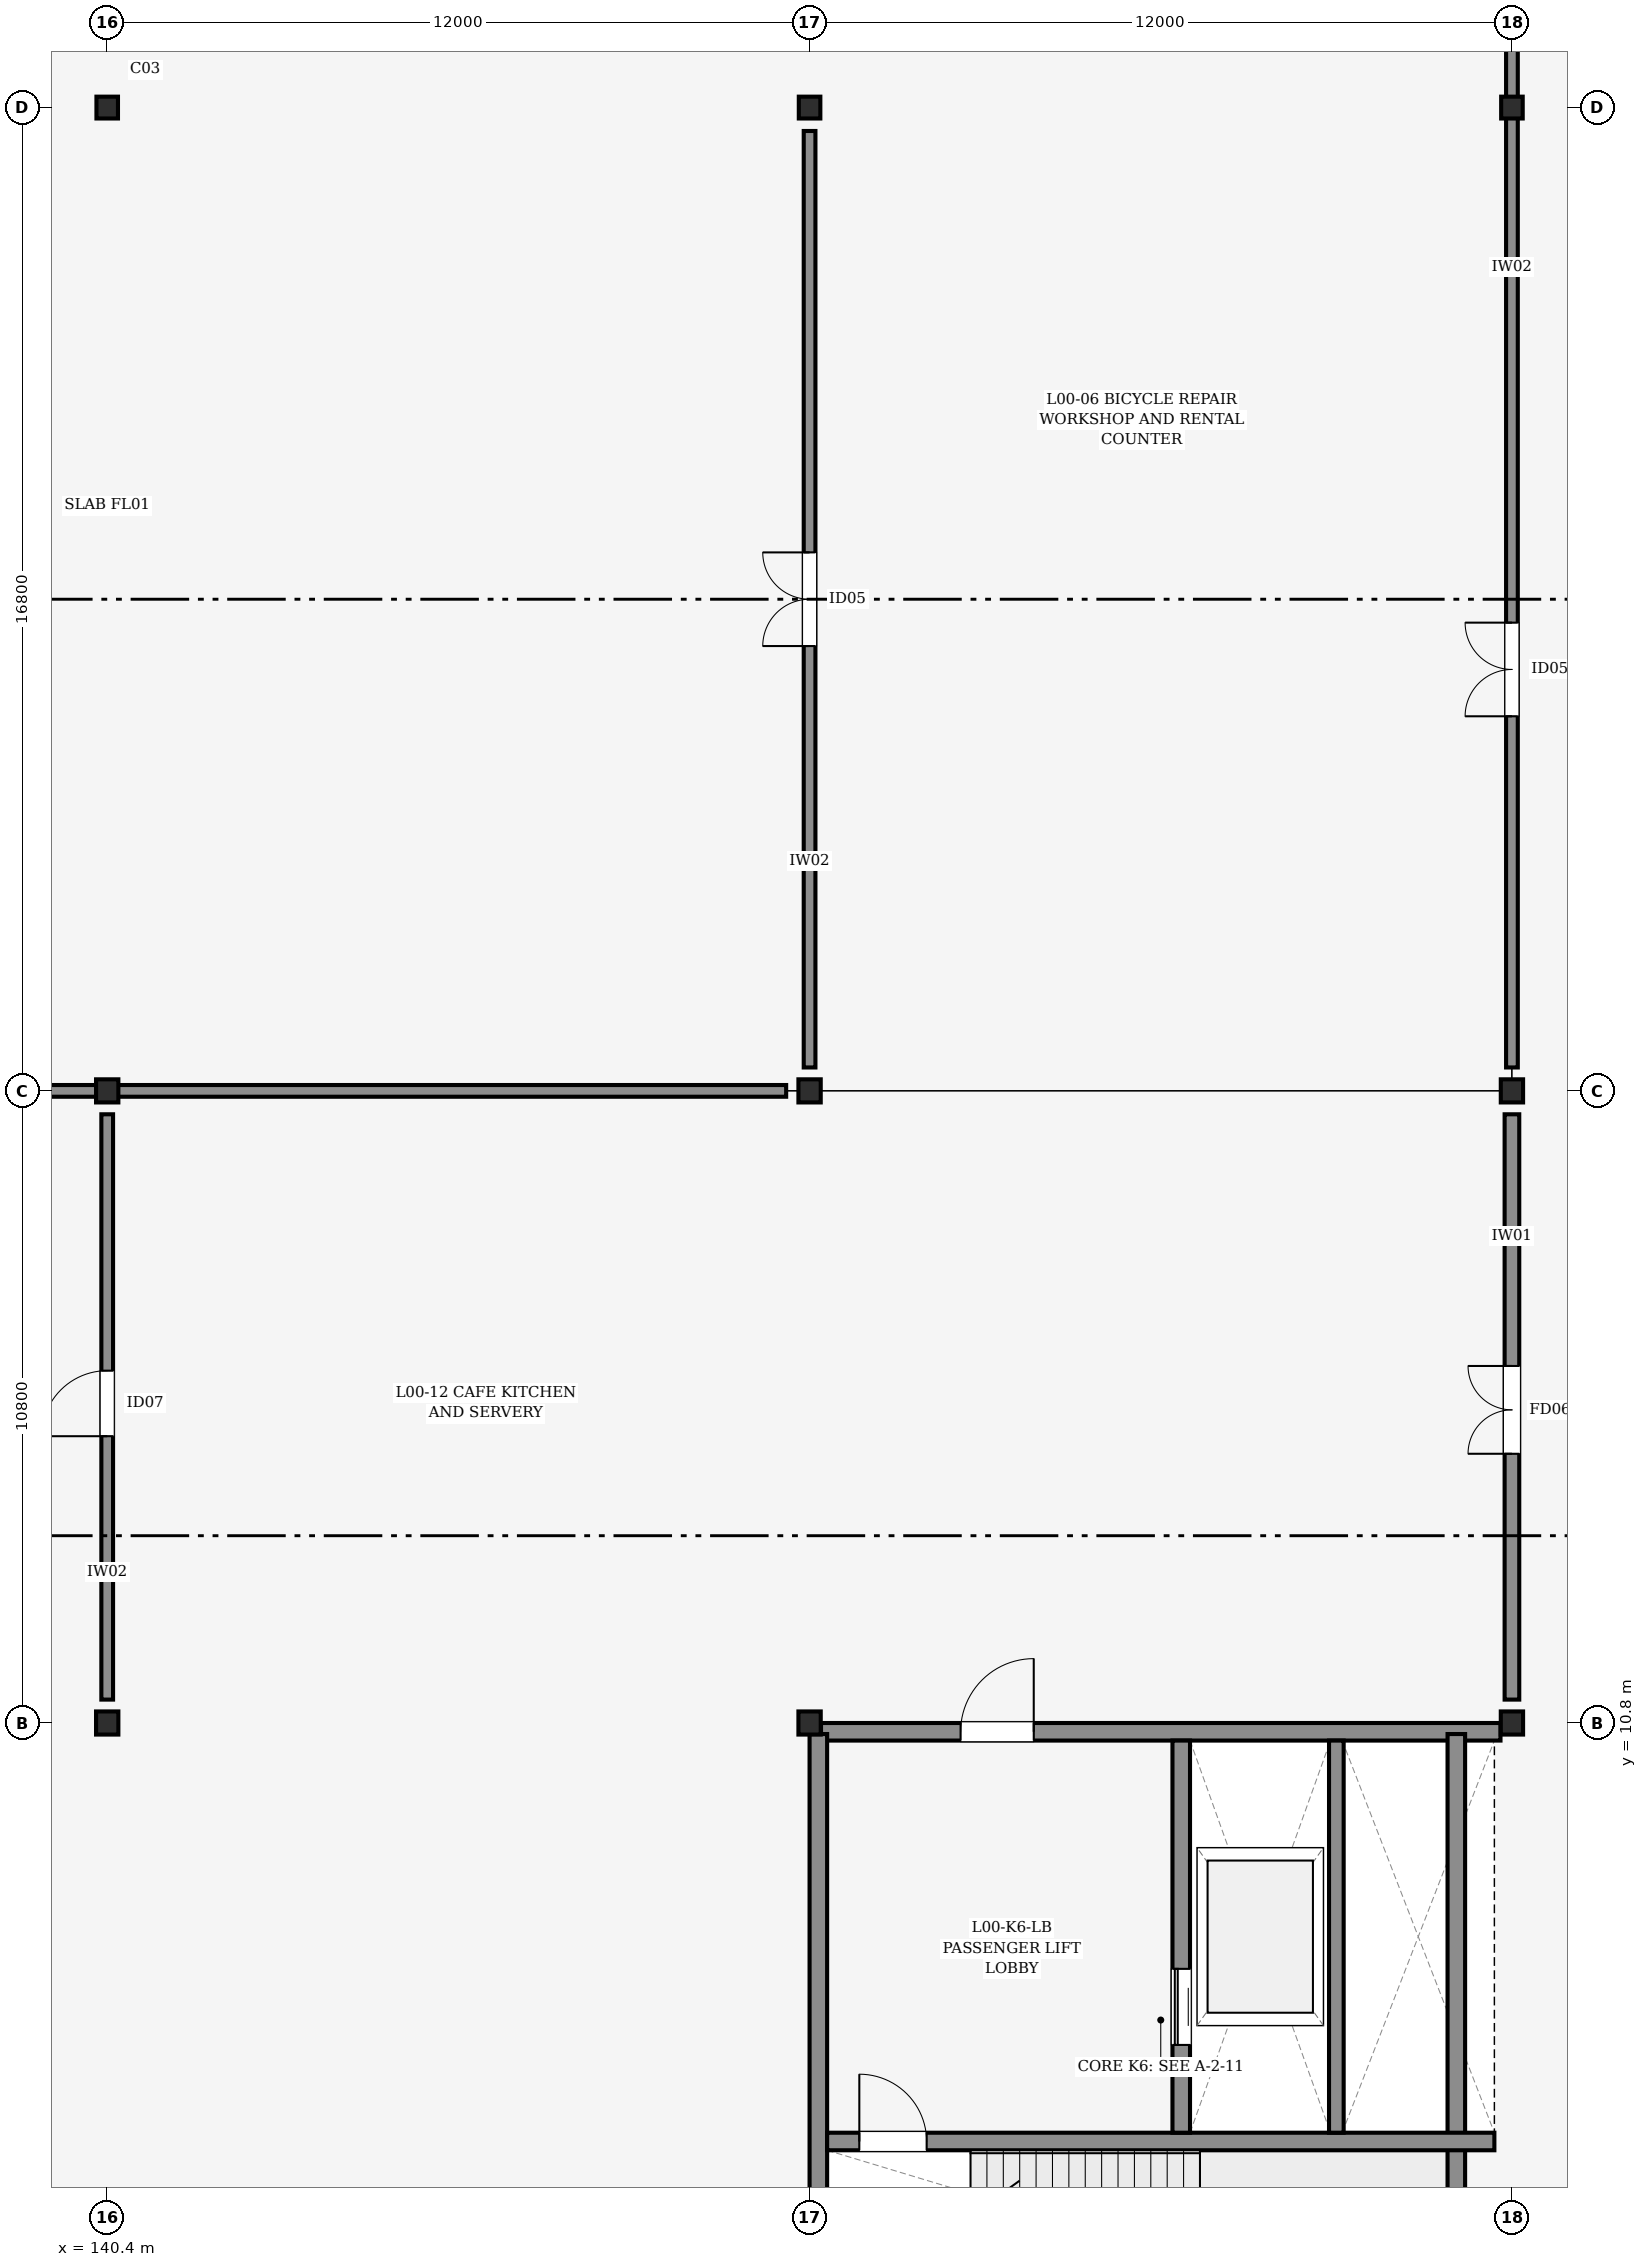
"""IFC4 building model, lengths in metres.
Left out: names, types, materials, properties, quantities, classifications, styles, units other than length and angle.
Written with IfcOpenShell. Run it as: python <this file> out.ifc"""

import sys

from ifc_helpers import new_model, si_unit, direction, frame, frame_2d, origin, origin_2d, place, context, subcontext, project, spatial, rectangle, i_section, extrude, element, fill, save


model = new_model("IFC4")
c1 = context("Model", 3, precision=1e-05, world=origin(), true_north=direction((0.0, 1.0)))
c2 = subcontext(c1, "Body", "Model", "MODEL_VIEW")
j1 = project(units=[si_unit("LENGTHUNIT", "METRE"), si_unit("PLANEANGLEUNIT", "RADIAN")], contexts=[c1])
p1 = place(None, origin())
s1 = spatial("IfcSite", under=j1, at=p1, CompositionType="ELEMENT")
p2 = place(p1, origin())
s2 = spatial("IfcBuilding", under=s1, at=p2, CompositionType="ELEMENT")
p3 = place(p2, origin())
s3 = spatial("IfcBuildingStorey", under=s2, at=p3, CompositionType="ELEMENT", Elevation=0.0)
for number, where, z_axis, x_axis in (
    (1, (140.4, 10.8, 0.0), (0.0, 0.0, 1.0), (1.0, 0.0, 0.0)),
    (2, (140.4, 21.6, 0.0), (0.0, 0.0, 1.0), (1.0, 0.0, 0.0)),
):
    element("IfcColumn", number, at=place(p3, frame(where, z_axis=z_axis, x_axis=x_axis)), inside=s3, PredefinedType="COLUMN", context=c2, shape_type="SweptSolid", body=[
        extrude(i_section(OverallWidth=0.395, OverallDepth=0.381, WebThickness=0.018, FlangeThickness=0.03, FilletRadius=0.015, at=origin_2d()), origin(), (0.0, 0.0, 1.0), 5.4),
    ])
p4 = place(p3, frame((140.4, 38.4, 0.0), z_axis=(0.0, 0.0, 1.0), x_axis=(1.0, 0.0, 0.0)))
e3 = element("IfcColumn", 3, at=p4, inside=s3, PredefinedType="COLUMN", context=c2, shape_type="SweptSolid", body=[
    extrude(i_section(OverallWidth=0.373, OverallDepth=0.368, WebThickness=0.014, FlangeThickness=0.024, FilletRadius=0.015, at=origin_2d()), origin(), (0.0, 0.0, 1.0), 5.4),
])
for number, where, z_axis, x_axis in (
    (4, (152.4, 10.8, 0.0), (0.0, 0.0, 1.0), (1.0, 0.0, 0.0)),
    (5, (152.4, 21.6, 0.0), (0.0, 0.0, 1.0), (1.0, 0.0, 0.0)),
):
    element("IfcColumn", number, at=place(p3, frame(where, z_axis=z_axis, x_axis=x_axis)), inside=s3, PredefinedType="COLUMN", context=c2, shape_type="SweptSolid", body=[
        extrude(i_section(OverallWidth=0.395, OverallDepth=0.381, WebThickness=0.018, FlangeThickness=0.03, FilletRadius=0.015, at=origin_2d()), origin(), (0.0, 0.0, 1.0), 5.4),
    ])
p5 = place(p3, frame((152.4, 38.4, 0.0), z_axis=(0.0, 0.0, 1.0), x_axis=(1.0, 0.0, 0.0)))
e6 = element("IfcColumn", 6, at=p5, inside=s3, PredefinedType="COLUMN", context=c2, shape_type="SweptSolid", body=[
    extrude(i_section(OverallWidth=0.373, OverallDepth=0.368, WebThickness=0.014, FlangeThickness=0.024, FilletRadius=0.015, at=origin_2d()), origin(), (0.0, 0.0, 1.0), 5.4),
])
for number, where, z_axis, x_axis in (
    (7, (164.4, 10.8, 0.0), (0.0, 0.0, 1.0), (1.0, 0.0, 0.0)),
    (8, (164.4, 21.6, 0.0), (0.0, 0.0, 1.0), (1.0, 0.0, 0.0)),
):
    element("IfcColumn", number, at=place(p3, frame(where, z_axis=z_axis, x_axis=x_axis)), inside=s3, PredefinedType="COLUMN", context=c2, shape_type="SweptSolid", body=[
        extrude(i_section(OverallWidth=0.395, OverallDepth=0.381, WebThickness=0.018, FlangeThickness=0.03, FilletRadius=0.015, at=origin_2d()), origin(), (0.0, 0.0, 1.0), 5.4),
    ])
p6 = place(p3, frame((164.4, 38.4, 0.0), z_axis=(0.0, 0.0, 1.0), x_axis=(1.0, 0.0, 0.0)))
e9 = element("IfcColumn", 9, at=p6, inside=s3, PredefinedType="COLUMN", context=c2, shape_type="SweptSolid", body=[
    extrude(i_section(OverallWidth=0.373, OverallDepth=0.368, WebThickness=0.014, FlangeThickness=0.024, FilletRadius=0.015, at=origin_2d()), origin(), (0.0, 0.0, 1.0), 5.4),
])
p7 = place(p3, frame((152.595, 10.65, 0.0), z_axis=(0.0, 0.0, 1.0), x_axis=(1.0, 0.0, 0.0)))
e10 = element("IfcWall", 10, at=p7, inside=s3, PredefinedType="SHEAR", context=c2, shape_type="SweptSolid", body=[
    extrude(rectangle(XDim=11.609, YDim=0.3, at=frame_2d((5.805, 0.0))), origin(), (0.0, 0.0, 1.0), 5.18),
])
p8 = place(p7, frame((2.385, 0.0, 0.0)))
e11 = element("IfcOpeningElement", 11, at=p8, cuts=e10, PredefinedType="OPENING", context=c2, shape_type="SweptSolid", body=[
    extrude(rectangle(XDim=1.25, YDim=2.15, at=frame_2d((0.625, 1.075))), frame((0.0, 0.16, 0.0), z_axis=(0.0, -1.0, 0.0), x_axis=(1.0, 0.0, 0.0)), (0.0, 0.0, 1.0), 0.32),
])
for number, where, z_axis, x_axis in (
    (12, (152.55, 0.188, 0.0), (0.0, 0.0, 1.0), (0.0, 1.0, 0.0)),
    (13, (163.45, 0.188, 0.0), (0.0, 0.0, 1.0), (0.0, 1.0, 0.0)),
):
    element("IfcWall", number, at=place(p3, frame(where, z_axis=z_axis, x_axis=x_axis)), inside=s3, PredefinedType="SHEAR", context=c2, shape_type="SweptSolid", body=[
        extrude(rectangle(XDim=10.423, YDim=0.3, at=frame_2d((5.211, 0.0))), origin(), (0.0, 0.0, 1.0), 5.18),
    ])
p9 = place(p3, frame((152.7, 3.65, 0.0), z_axis=(0.0, 0.0, 1.0), x_axis=(1.0, 0.0, 0.0)))
e14 = element("IfcWall", 14, at=p9, inside=s3, PredefinedType="SHEAR", context=c2, shape_type="SweptSolid", body=[
    extrude(rectangle(XDim=11.4, YDim=0.3, at=frame_2d((5.7, 0.0))), origin(), (0.0, 0.0, 1.0), 5.18),
])
p10 = place(p9, frame((0.55, 0.0, 0.0)))
e15 = element("IfcOpeningElement", 15, at=p10, cuts=e14, PredefinedType="OPENING", context=c2, shape_type="SweptSolid", body=[
    extrude(rectangle(XDim=1.15, YDim=2.15, at=frame_2d((0.575, 1.075))), frame((0.0, 0.16, 0.0), z_axis=(0.0, -1.0, 0.0), x_axis=(1.0, 0.0, 0.0)), (0.0, 0.0, 1.0), 0.32),
])
p11 = place(p3, frame((158.75, 3.8, 0.0), z_axis=(0.0, 0.0, 1.0), x_axis=(0.0, 1.0, 0.0)))
e16 = element("IfcWall", 16, at=p11, inside=s3, PredefinedType="SHEAR", context=c2, shape_type="SweptSolid", body=[
    extrude(rectangle(XDim=6.7, YDim=0.3, at=frame_2d((3.35, 0.0))), origin(), (0.0, 0.0, 1.0), 5.18),
])
p12 = place(p11, frame((1.5, 0.0, 0.0)))
e17 = element("IfcOpeningElement", 17, at=p12, cuts=e16, PredefinedType="OPENING", context=c2, shape_type="SweptSolid", body=[
    extrude(rectangle(XDim=1.3, YDim=2.3, at=frame_2d((0.65, 1.15))), frame((0.0, 0.16, 0.0), z_axis=(0.0, -1.0, 0.0), x_axis=(1.0, 0.0, 0.0)), (0.0, 0.0, 1.0), 0.32),
])
p13 = place(p3, frame((161.4, 3.8, 0.0), z_axis=(0.0, 0.0, 1.0), x_axis=(0.0, 1.0, 0.0)))
e18 = element("IfcWall", 18, at=p13, inside=s3, PredefinedType="PARTITIONING", context=c2, shape_type="SweptSolid", body=[
    extrude(rectangle(XDim=6.7, YDim=0.25, at=frame_2d((3.35, 0.0))), origin(), (0.0, 0.0, 1.0), 4.325),
])
p14 = place(p3, frame((152.4, 22.0, 0.0), z_axis=(0.0, 0.0, 1.0), x_axis=(0.0, 1.0, 0.0)))
e19 = element("IfcWall", 19, at=p14, inside=s3, PredefinedType="PARTITIONING", context=c2, shape_type="SweptSolid", body=[
    extrude(rectangle(XDim=16.0, YDim=0.2, at=frame_2d((8.0, 0.0))), origin(), (0.0, 0.0, 1.0), 4.325),
])
p15 = place(p14, frame((7.2, 0.0, 0.0)))
e20 = element("IfcOpeningElement", 20, at=p15, cuts=e19, PredefinedType="OPENING", context=c2, shape_type="SweptSolid", body=[
    extrude(rectangle(XDim=1.6, YDim=2.25, at=frame_2d((0.8, 1.125))), frame((0.0, 0.11, 0.0), z_axis=(0.0, -1.0, 0.0), x_axis=(1.0, 0.0, 0.0)), (0.0, 0.0, 1.0), 0.22),
])
p16 = place(p3, frame((116.8, 21.6, 0.0), z_axis=(0.0, 0.0, 1.0), x_axis=(1.0, 0.0, 0.0)))
e21 = element("IfcWall", 21, at=p16, inside=s3, PredefinedType="PARTITIONING", context=c2, shape_type="SweptSolid", body=[
    extrude(rectangle(XDim=35.2, YDim=0.2, at=frame_2d((17.6, 0.0))), origin(), (0.0, 0.0, 1.0), 4.325),
])
p17 = place(p16, frame((5.0, 0.0, 0.0)))
e22 = element("IfcOpeningElement", 22, at=p17, cuts=e21, PredefinedType="OPENING", context=c2, shape_type="SweptSolid", body=[
    extrude(rectangle(XDim=1.6, YDim=2.25, at=frame_2d((0.8, 1.125))), frame((0.0, 0.11, 0.0), z_axis=(0.0, -1.0, 0.0), x_axis=(1.0, 0.0, 0.0)), (0.0, 0.0, 1.0), 0.22),
])
p18 = place(p3, frame((140.4, 11.2, 0.0), z_axis=(0.0, 0.0, 1.0), x_axis=(0.0, 1.0, 0.0)))
e23 = element("IfcWall", 23, at=p18, inside=s3, PredefinedType="PARTITIONING", context=c2, shape_type="SweptSolid", body=[
    extrude(rectangle(XDim=10.0, YDim=0.2, at=frame_2d((5.0, 0.0))), origin(), (0.0, 0.0, 1.0), 4.325),
])
p19 = place(p18, frame((4.5, 0.0, 0.0)))
e24 = element("IfcOpeningElement", 24, at=p19, cuts=e23, PredefinedType="OPENING", context=c2, shape_type="SweptSolid", body=[
    extrude(rectangle(XDim=1.12, YDim=2.15, at=frame_2d((0.56, 1.075))), frame((0.0, 0.11, 0.0), z_axis=(0.0, -1.0, 0.0), x_axis=(1.0, 0.0, 0.0)), (0.0, 0.0, 1.0), 0.22),
])
p20 = place(p3, frame((164.4, 11.2, 0.0), z_axis=(0.0, 0.0, 1.0), x_axis=(0.0, 1.0, 0.0)))
e25 = element("IfcWall", 25, at=p20, inside=s3, PredefinedType="PARTITIONING", context=c2, shape_type="SweptSolid", body=[
    extrude(rectangle(XDim=10.0, YDim=0.25, at=frame_2d((5.0, 0.0))), origin(), (0.0, 0.0, 1.0), 4.325),
])
p21 = place(p20, frame((4.2, 0.0, 0.0)))
e26 = element("IfcOpeningElement", 26, at=p21, cuts=e25, PredefinedType="OPENING", context=c2, shape_type="SweptSolid", body=[
    extrude(rectangle(XDim=1.5, YDim=2.25, at=frame_2d((0.75, 1.125))), frame((0.0, 0.135, 0.0), z_axis=(0.0, -1.0, 0.0), x_axis=(1.0, 0.0, 0.0)), (0.0, 0.0, 1.0), 0.27),
])
p22 = place(p3, frame((164.4, 22.0, 0.0), z_axis=(0.0, 0.0, 1.0), x_axis=(0.0, 1.0, 0.0)))
e27 = element("IfcWall", 27, at=p22, inside=s3, PredefinedType="PARTITIONING", context=c2, shape_type="SweptSolid", body=[
    extrude(rectangle(XDim=41.2, YDim=0.2, at=frame_2d((20.6, 0.0))), origin(), (0.0, 0.0, 1.0), 4.325),
])
p23 = place(p22, frame((6.0, 0.0, 0.0)))
e28 = element("IfcOpeningElement", 28, at=p23, cuts=e27, PredefinedType="OPENING", context=c2, shape_type="SweptSolid", body=[
    extrude(rectangle(XDim=1.6, YDim=2.25, at=frame_2d((0.8, 1.125))), frame((0.0, 0.11, 0.0), z_axis=(0.0, -1.0, 0.0), x_axis=(1.0, 0.0, 0.0)), (0.0, 0.0, 1.0), 0.22),
])
p24 = place(p8, origin())
e29 = element("IfcDoor", 29, at=p24, inside=s3, OperationType="SINGLE_SWING_RIGHT", PredefinedType="DOOR", context=c2, shape_type="SweptSolid", body=[
    extrude(rectangle(XDim=1.25, YDim=2.15, at=frame_2d((0.625, 1.075))), frame((0.0, 0.025, 0.0), z_axis=(0.0, -1.0, 0.0), x_axis=(1.0, 0.0, 0.0)), (0.0, 0.0, 1.0), 0.05),
])
fill(e11, e29)
p25 = place(p10, origin())
e30 = element("IfcDoor", 30, at=p25, inside=s3, OperationType="SINGLE_SWING_LEFT", PredefinedType="DOOR", context=c2, shape_type="SweptSolid", body=[
    extrude(rectangle(XDim=1.15, YDim=2.15, at=frame_2d((0.575, 1.075))), frame((0.0, 0.025, 0.0), z_axis=(0.0, -1.0, 0.0), x_axis=(1.0, 0.0, 0.0)), (0.0, 0.0, 1.0), 0.05),
])
fill(e15, e30)
p26 = place(p12, origin())
e31 = element("IfcDoor", 31, at=p26, inside=s3, OperationType="SLIDING_TO_LEFT", PredefinedType="DOOR", context=c2, shape_type="SweptSolid", body=[
    extrude(rectangle(XDim=1.3, YDim=2.3, at=frame_2d((0.65, 1.15))), frame((0.0, 0.025, 0.0), z_axis=(0.0, -1.0, 0.0), x_axis=(1.0, 0.0, 0.0)), (0.0, 0.0, 1.0), 0.05),
])
fill(e17, e31)
p27 = place(p15, origin())
e32 = element("IfcDoor", 32, at=p27, inside=s3, OperationType="DOUBLE_DOOR_SINGLE_SWING", PredefinedType="DOOR", context=c2, shape_type="SweptSolid", body=[
    extrude(rectangle(XDim=1.6, YDim=2.25, at=frame_2d((0.8, 1.125))), frame((0.0, 0.025, 0.0), z_axis=(0.0, -1.0, 0.0), x_axis=(1.0, 0.0, 0.0)), (0.0, 0.0, 1.0), 0.05),
])
fill(e20, e32)
p28 = place(p19, origin())
e33 = element("IfcDoor", 33, at=p28, inside=s3, OperationType="SINGLE_SWING_LEFT", PredefinedType="DOOR", context=c2, shape_type="SweptSolid", body=[
    extrude(rectangle(XDim=1.12, YDim=2.15, at=frame_2d((0.56, 1.075))), frame((0.0, 0.025, 0.0), z_axis=(0.0, -1.0, 0.0), x_axis=(1.0, 0.0, 0.0)), (0.0, 0.0, 1.0), 0.05),
])
fill(e24, e33)
p29 = place(p21, origin())
e34 = element("IfcDoor", 34, at=p29, inside=s3, OperationType="DOUBLE_DOOR_SINGLE_SWING", PredefinedType="DOOR", context=c2, shape_type="SweptSolid", body=[
    extrude(rectangle(XDim=1.5, YDim=2.25, at=frame_2d((0.75, 1.125))), frame((0.0, 0.025, 0.0), z_axis=(0.0, -1.0, 0.0), x_axis=(1.0, 0.0, 0.0)), (0.0, 0.0, 1.0), 0.05),
])
fill(e26, e34)
p30 = place(p23, origin())
e35 = element("IfcDoor", 35, at=p30, inside=s3, OperationType="DOUBLE_DOOR_SINGLE_SWING", PredefinedType="DOOR", context=c2, shape_type="SweptSolid", body=[
    extrude(rectangle(XDim=1.6, YDim=2.25, at=frame_2d((0.8, 1.125))), frame((0.0, 0.025, 0.0), z_axis=(0.0, -1.0, 0.0), x_axis=(1.0, 0.0, 0.0)), (0.0, 0.0, 1.0), 0.05),
])
fill(e28, e35)
save(model, sys.argv[1])
